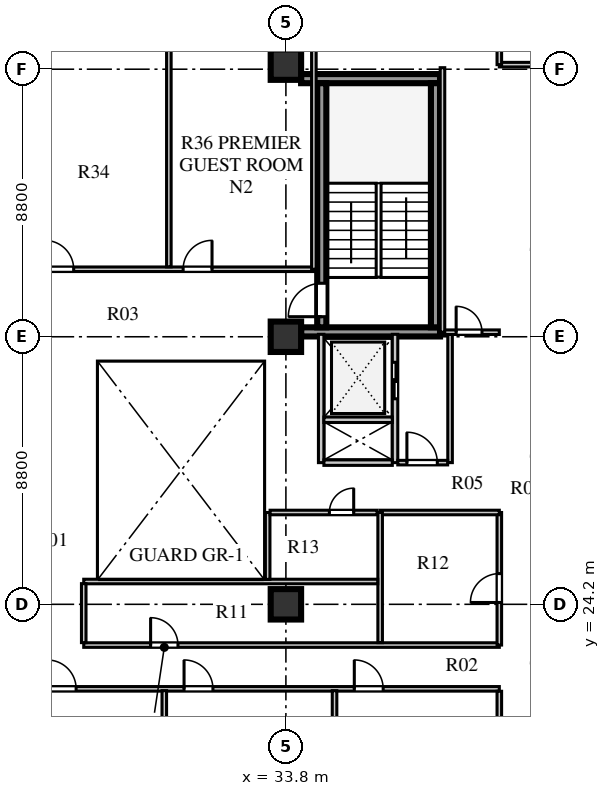
"""IFC4 building model, lengths in metres.
Left out: names, types, materials, properties, quantities, classifications, styles, units other than length and angle.
Written with IfcOpenShell. Run it as: python <this file> out.ifc"""

import sys

from ifc_helpers import new_model, si_unit, direction, frame, frame_2d, origin, origin_2d, place, context, subcontext, project, spatial, rectangle, extrude, element, fill, save


model = new_model("IFC4")
c1 = context("Model", 3, precision=1e-05, world=origin(), true_north=direction((0.0, 1.0)))
c2 = subcontext(c1, "Body", "Model", "MODEL_VIEW")
j1 = project(units=[si_unit("LENGTHUNIT", "METRE"), si_unit("PLANEANGLEUNIT", "RADIAN")], contexts=[c1])
p1 = place(None, origin())
s1 = spatial("IfcSite", under=j1, at=p1, CompositionType="ELEMENT")
p2 = place(p1, origin())
s2 = spatial("IfcBuilding", under=s1, at=p2, CompositionType="ELEMENT")
p3 = place(p2, frame((0.0, 0.0, 127.1)))
s3 = spatial("IfcBuildingStorey", under=s2, at=p3, CompositionType="ELEMENT", Elevation=127.1)
for number, where, z_axis, x_axis in (
    (1, (34.3, 33.16, 0.0), (0.0, 0.0, 1.0), (1.0, 0.0, 0.0)),
    (2, (34.3, 41.49, 0.0), (0.0, 0.0, 1.0), (1.0, 0.0, 0.0)),
):
    element("IfcWall", number, at=place(p3, frame(where, z_axis=z_axis, x_axis=x_axis)), inside=s3, PredefinedType="SHEAR", context=c2, shape_type="SweptSolid", body=[
        extrude(rectangle(XDim=4.57, YDim=0.3, at=frame_2d((2.285, 0.0))), origin(), (0.0, 0.0, 1.0), 3.6),
    ])
p4 = place(p3, frame((34.98, 33.31, 0.0), z_axis=(0.0, 0.0, 1.0), x_axis=(0.0, 1.0, 0.0)))
e3 = element("IfcWall", 3, at=p4, inside=s3, PredefinedType="SHEAR", context=c2, shape_type="SweptSolid", body=[
    extrude(rectangle(XDim=8.03, YDim=0.3, at=frame_2d((4.015, 0.0))), origin(), (0.0, 0.0, 1.0), 3.6),
])
p5 = place(p4, frame((0.35, 0.0, 0.0)))
e4 = element("IfcOpeningElement", 4, at=p5, cuts=e3, PredefinedType="OPENING", context=c2, shape_type="SweptSolid", body=[
    extrude(rectangle(XDim=1.1, YDim=2.1, at=frame_2d((0.55, 1.05))), frame((0.0, 0.16, 0.0), z_axis=(0.0, -1.0, 0.0), x_axis=(1.0, 0.0, 0.0)), (0.0, 0.0, 1.0), 0.32),
])
p6 = place(p3, frame((38.72, 33.31, 0.0), z_axis=(0.0, 0.0, 1.0), x_axis=(0.0, 1.0, 0.0)))
e5 = element("IfcWall", 5, at=p6, inside=s3, PredefinedType="SHEAR", context=c2, shape_type="SweptSolid", body=[
    extrude(rectangle(XDim=8.03, YDim=0.3, at=frame_2d((4.015, 0.0))), origin(), (0.0, 0.0, 1.0), 3.6),
])
for number, where, z_axis, x_axis in (
    (6, (33.8, 24.2, 0.0), (0.0, 0.0, 1.0), (1.0, 0.0, 0.0)),
    (7, (33.8, 33.0, 0.0), (0.0, 0.0, 1.0), (1.0, 0.0, 0.0)),
    (8, (33.8, 41.95, 0.0), (0.0, 0.0, 1.0), (1.0, 0.0, 0.0)),
):
    element("IfcColumn", number, at=place(p3, frame(where, z_axis=z_axis, x_axis=x_axis)), inside=s3, PredefinedType="COLUMN", context=c2, shape_type="SweptSolid", body=[
        extrude(rectangle(XDim=1.0, YDim=1.0, at=origin_2d()), origin(), (0.0, 0.0, 1.0), 3.6),
    ])
p7 = place(p3, frame((34.96, 28.86, 0.0), z_axis=(0.0, 0.0, 1.0), x_axis=(0.0, 1.0, 0.0)))
e9 = element("IfcWall", 9, at=p7, inside=s3, PredefinedType="SOLIDWALL", context=c2, shape_type="SweptSolid", body=[
    extrude(rectangle(XDim=4.22, YDim=0.18, at=frame_2d((2.11, 0.0))), origin(), (0.0, 0.0, 1.0), 3.6),
])
p8 = place(p3, frame((37.39, 28.86, 0.0), z_axis=(0.0, 0.0, 1.0), x_axis=(0.0, 1.0, 0.0)))
e10 = element("IfcWall", 10, at=p8, inside=s3, PredefinedType="SOLIDWALL", context=c2, shape_type="SweptSolid", body=[
    extrude(rectangle(XDim=4.22, YDim=0.18, at=frame_2d((2.11, 0.0))), origin(), (0.0, 0.0, 1.0), 3.6),
])
p9 = place(p8, frame((2.1, 0.0, 0.0)))
e11 = element("IfcOpeningElement", 11, at=p9, cuts=e10, PredefinedType="OPENING", context=c2, shape_type="SweptSolid", body=[
    extrude(rectangle(XDim=1.2, YDim=2.12, at=frame_2d((0.6, 1.06))), frame((0.0, 0.1, 0.0), z_axis=(0.0, -1.0, 0.0), x_axis=(1.0, 0.0, 0.0)), (0.0, 0.0, 1.0), 0.2),
])
for number, where, z_axis, x_axis in (
    (12, (35.05, 28.86, 0.0), (0.0, 0.0, 1.0), (1.0, 0.0, 0.0)),
    (13, (35.05, 30.27, 0.0), (0.0, 0.0, 1.0), (1.0, 0.0, 0.0)),
):
    element("IfcWall", number, at=place(p3, frame(where, z_axis=z_axis, x_axis=x_axis)), inside=s3, PredefinedType="SOLIDWALL", context=c2, shape_type="SweptSolid", body=[
        extrude(rectangle(XDim=2.25, YDim=0.18, at=frame_2d((1.125, 0.0))), origin(), (0.0, 0.0, 1.0), 3.6),
    ])
p10 = place(p3, frame((39.2, 28.86, 0.0), z_axis=(0.0, 0.0, 1.0), x_axis=(0.0, 1.0, 0.0)))
e14 = element("IfcWall", 14, at=p10, inside=s3, PredefinedType="PARTITIONING", context=c2, shape_type="SweptSolid", body=[
    extrude(rectangle(XDim=4.22, YDim=0.15, at=frame_2d((2.11, 0.0))), origin(), (0.0, 0.0, 1.0), 3.6),
])
p11 = place(p3, frame((37.48, 28.86, 0.0), z_axis=(0.0, 0.0, 1.0), x_axis=(1.0, 0.0, 0.0)))
e15 = element("IfcWall", 15, at=p11, inside=s3, PredefinedType="PARTITIONING", context=c2, shape_type="SweptSolid", body=[
    extrude(rectangle(XDim=1.64, YDim=0.15, at=frame_2d((0.82, 0.0))), origin(), (0.0, 0.0, 1.0), 3.6),
])
p12 = place(p11, frame((0.3, 0.0, 0.0)))
e16 = element("IfcOpeningElement", 16, at=p12, cuts=e15, PredefinedType="OPENING", context=c2, shape_type="SweptSolid", body=[
    extrude(rectangle(XDim=1.0, YDim=2.1, at=frame_2d((0.5, 1.05))), frame((0.0, 0.085, 0.0), z_axis=(0.0, -1.0, 0.0), x_axis=(1.0, 0.0, 0.0)), (0.0, 0.0, 1.0), 0.17),
])
p13 = place(p3, frame((25.22, 21.42, 0.0), z_axis=(0.0, 0.0, 1.0), x_axis=(1.0, 0.0, 0.0)))
e17 = element("IfcWall", 17, at=p13, inside=s3, PredefinedType="PARTITIONING", context=c2, shape_type="SweptSolid", body=[
    extrude(rectangle(XDim=15.6, YDim=0.15, at=frame_2d((7.8, 0.0))), origin(), (0.0, 0.0, 1.0), 3.2),
])
p14 = place(p13, frame((0.73, 0.0, 0.0)))
e18 = element("IfcOpeningElement", 18, at=p14, cuts=e17, PredefinedType="OPENING", context=c2, shape_type="SweptSolid", body=[
    extrude(rectangle(XDim=0.95, YDim=2.1, at=frame_2d((0.475, 1.05))), frame((0.0, 0.085, 0.0), z_axis=(0.0, -1.0, 0.0), x_axis=(1.0, 0.0, 0.0)), (0.0, 0.0, 1.0), 0.17),
])
p15 = place(p13, frame((5.23, 0.0, 0.0)))
e19 = element("IfcOpeningElement", 19, at=p15, cuts=e17, PredefinedType="OPENING", context=c2, shape_type="SweptSolid", body=[
    extrude(rectangle(XDim=0.95, YDim=2.1, at=frame_2d((0.475, 1.05))), frame((0.0, 0.085, 0.0), z_axis=(0.0, -1.0, 0.0), x_axis=(1.0, 0.0, 0.0)), (0.0, 0.0, 1.0), 0.17),
])
p16 = place(p13, frame((10.83, 0.0, 0.0)))
e20 = element("IfcOpeningElement", 20, at=p16, cuts=e17, PredefinedType="OPENING", context=c2, shape_type="SweptSolid", body=[
    extrude(rectangle(XDim=0.95, YDim=2.1, at=frame_2d((0.475, 1.05))), frame((0.0, 0.085, 0.0), z_axis=(0.0, -1.0, 0.0), x_axis=(1.0, 0.0, 0.0)), (0.0, 0.0, 1.0), 0.17),
])
p17 = place(p3, frame((27.15, 22.86, 0.0), z_axis=(0.0, 0.0, 1.0), x_axis=(1.0, 0.0, 0.0)))
e21 = element("IfcWall", 21, at=p17, inside=s3, PredefinedType="PARTITIONING", context=c2, shape_type="SweptSolid", body=[
    extrude(rectangle(XDim=13.67, YDim=0.15, at=frame_2d((6.835, 0.0))), origin(), (0.0, 0.0, 1.0), 3.6),
])
p18 = place(p17, frame((2.2, 0.0, 0.0)))
e22 = element("IfcOpeningElement", 22, at=p18, cuts=e21, PredefinedType="OPENING", context=c2, shape_type="SweptSolid", body=[
    extrude(rectangle(XDim=0.9, YDim=2.08, at=frame_2d((0.45, 1.04))), frame((0.0, 0.085, 0.0), z_axis=(0.0, -1.0, 0.0), x_axis=(1.0, 0.0, 0.0)), (0.0, 0.0, 1.0), 0.17),
])
p19 = place(p3, frame((25.22, 35.22, 0.0), z_axis=(0.0, 0.0, 1.0), x_axis=(1.0, 0.0, 0.0)))
e23 = element("IfcWall", 23, at=p19, inside=s3, PredefinedType="PARTITIONING", context=c2, shape_type="SweptSolid", body=[
    extrude(rectangle(XDim=9.5, YDim=0.15, at=frame_2d((4.75, 0.0))), origin(), (0.0, 0.0, 1.0), 3.6),
])
p20 = place(p19, frame((0.65, 0.0, 0.0)))
e24 = element("IfcOpeningElement", 24, at=p20, cuts=e23, PredefinedType="OPENING", context=c2, shape_type="SweptSolid", body=[
    extrude(rectangle(XDim=0.95, YDim=2.1, at=frame_2d((0.475, 1.05))), frame((0.0, 0.085, 0.0), z_axis=(0.0, -1.0, 0.0), x_axis=(1.0, 0.0, 0.0)), (0.0, 0.0, 1.0), 0.17),
])
p21 = place(p19, frame((5.2, 0.0, 0.0)))
e25 = element("IfcOpeningElement", 25, at=p21, cuts=e23, PredefinedType="OPENING", context=c2, shape_type="SweptSolid", body=[
    extrude(rectangle(XDim=0.95, YDim=2.1, at=frame_2d((0.475, 1.05))), frame((0.0, 0.085, 0.0), z_axis=(0.0, -1.0, 0.0), x_axis=(1.0, 0.0, 0.0)), (0.0, 0.0, 1.0), 0.17),
])
p22 = place(p3, frame((40.82, 41.95, 0.0), z_axis=(0.0, 0.0, 1.0), x_axis=(1.0, 0.0, 0.0)))
e26 = element("IfcWall", 26, at=p22, inside=s3, PredefinedType="PARTITIONING", context=c2, shape_type="SweptSolid", body=[
    extrude(rectangle(XDim=7.3, YDim=0.15, at=frame_2d((3.65, 0.0))), origin(), (0.0, 0.0, 1.0), 2.95),
])
p23 = place(p3, frame((40.82, 22.86, 0.0), z_axis=(0.0, 0.0, 1.0), x_axis=(0.0, 1.0, 0.0)))
e27 = element("IfcWall", 27, at=p23, inside=s3, PredefinedType="PARTITIONING", context=c2, shape_type="SweptSolid", body=[
    extrude(rectangle(XDim=4.36, YDim=0.15, at=frame_2d((2.18, 0.0))), origin(), (0.0, 0.0, 1.0), 3.6),
])
p24 = place(p23, frame((1.4, 0.0, 0.0)))
e28 = element("IfcOpeningElement", 28, at=p24, cuts=e27, PredefinedType="OPENING", context=c2, shape_type="SweptSolid", body=[
    extrude(rectangle(XDim=0.95, YDim=2.1, at=frame_2d((0.475, 1.05))), frame((0.0, 0.085, 0.0), z_axis=(0.0, -1.0, 0.0), x_axis=(1.0, 0.0, 0.0)), (0.0, 0.0, 1.0), 0.17),
])
p25 = place(p3, frame((36.9, 27.22, 0.0), z_axis=(0.0, 0.0, 1.0), x_axis=(1.0, 0.0, 0.0)))
e29 = element("IfcWall", 29, at=p25, inside=s3, PredefinedType="PARTITIONING", context=c2, shape_type="SweptSolid", body=[
    extrude(rectangle(XDim=3.92, YDim=0.15, at=frame_2d((1.96, 0.0))), origin(), (0.0, 0.0, 1.0), 3.2),
])
p26 = place(p3, frame((36.9, 22.94, 0.0), z_axis=(0.0, 0.0, 1.0), x_axis=(0.0, 1.0, 0.0)))
e30 = element("IfcWall", 30, at=p26, inside=s3, PredefinedType="PARTITIONING", context=c2, shape_type="SweptSolid", body=[
    extrude(rectangle(XDim=4.28, YDim=0.15, at=frame_2d((2.14, 0.0))), origin(), (0.0, 0.0, 1.0), 3.6),
])
p27 = place(p3, frame((27.15, 24.95, 0.0), z_axis=(0.0, 0.0, 1.0), x_axis=(1.0, 0.0, 0.0)))
e31 = element("IfcWall", 31, at=p27, inside=s3, PredefinedType="PARTITIONING", context=c2, shape_type="SweptSolid", body=[
    extrude(rectangle(XDim=9.67, YDim=0.15, at=frame_2d((4.835, 0.0))), origin(), (0.0, 0.0, 1.0), 3.05),
])
p28 = place(p3, frame((27.15, 22.94, 0.0), z_axis=(0.0, 0.0, 1.0), x_axis=(0.0, 1.0, 0.0)))
e32 = element("IfcWall", 32, at=p28, inside=s3, PredefinedType="PARTITIONING", context=c2, shape_type="SweptSolid", body=[
    extrude(rectangle(XDim=1.94, YDim=0.15, at=frame_2d((0.97, 0.0))), origin(), (0.0, 0.0, 1.0), 3.6),
])
p29 = place(p3, frame((33.2, 25.02, 0.0), z_axis=(0.0, 0.0, 1.0), x_axis=(0.0, 1.0, 0.0)))
e33 = element("IfcWall", 33, at=p29, inside=s3, PredefinedType="PARTITIONING", context=c2, shape_type="SweptSolid", body=[
    extrude(rectangle(XDim=2.2, YDim=0.15, at=frame_2d((1.1, 0.0))), origin(), (0.0, 0.0, 1.0), 3.05),
])
p30 = place(p3, frame((33.28, 27.22, 0.0), z_axis=(0.0, 0.0, 1.0), x_axis=(1.0, 0.0, 0.0)))
e34 = element("IfcWall", 34, at=p30, inside=s3, PredefinedType="PARTITIONING", context=c2, shape_type="SweptSolid", body=[
    extrude(rectangle(XDim=3.52, YDim=0.15, at=frame_2d((1.76, 0.0))), origin(), (0.0, 0.0, 1.0), 3.2),
])
p31 = place(p30, frame((1.95, 0.0, 0.0)))
e35 = element("IfcOpeningElement", 35, at=p31, cuts=e34, PredefinedType="OPENING", context=c2, shape_type="SweptSolid", body=[
    extrude(rectangle(XDim=0.8, YDim=2.05, at=frame_2d((0.4, 1.025))), frame((0.0, 0.085, 0.0), z_axis=(0.0, -1.0, 0.0), x_axis=(1.0, 0.0, 0.0)), (0.0, 0.0, 1.0), 0.17),
])
p32 = place(p3, frame((40.82, 10.28, 0.0), z_axis=(0.0, 0.0, 1.0), x_axis=(0.0, 1.0, 0.0)))
e36 = element("IfcWall", 36, at=p32, inside=s3, PredefinedType="PARTITIONING", context=c2, shape_type="SweptSolid", body=[
    extrude(rectangle(XDim=11.06, YDim=0.15, at=frame_2d((5.53, 0.0))), origin(), (0.0, 0.0, 1.0), 3.6),
])
for number, where, z_axis, x_axis in (
    (37, (29.8, 10.28, 0.0), (0.0, 0.0, 1.0), (0.0, 1.0, 0.0)),
    (38, (35.4, 10.28, 0.0), (0.0, 0.0, 1.0), (0.0, 1.0, 0.0)),
):
    element("IfcWall", number, at=place(p3, frame(where, z_axis=z_axis, x_axis=x_axis)), inside=s3, PredefinedType="PARTITIONING", context=c2, shape_type="SweptSolid", body=[
        extrude(rectangle(XDim=11.08, YDim=0.15, at=frame_2d((5.54, 0.0))), origin(), (0.0, 0.0, 1.0), 3.6),
    ])
p33 = place(p3, frame((34.72, 35.22, 0.0), z_axis=(0.0, 0.0, 1.0), x_axis=(0.0, 1.0, 0.0)))
e39 = element("IfcWall", 39, at=p33, inside=s3, PredefinedType="PARTITIONING", context=c2, shape_type="SweptSolid", body=[
    extrude(rectangle(XDim=11.7, YDim=0.15, at=frame_2d((5.85, 0.0))), origin(), (0.0, 0.0, 1.0), 3.6),
])
p34 = place(p3, frame((29.95, 35.3, 0.0), z_axis=(0.0, 0.0, 1.0), x_axis=(0.0, 1.0, 0.0)))
e40 = element("IfcWall", 40, at=p34, inside=s3, PredefinedType="PARTITIONING", context=c2, shape_type="SweptSolid", body=[
    extrude(rectangle(XDim=11.62, YDim=0.15, at=frame_2d((5.81, 0.0))), origin(), (0.0, 0.0, 1.0), 3.6),
])
p35 = place(p3, frame((38.95, 33.15, 0.0), z_axis=(0.0, 0.0, 1.0), x_axis=(1.0, 0.0, 0.0)))
e41 = element("IfcWall", 41, at=p35, inside=s3, PredefinedType="PARTITIONING", context=c2, shape_type="SweptSolid", body=[
    extrude(rectangle(XDim=1.87, YDim=0.15, at=frame_2d((0.935, 0.0))), origin(), (0.0, 0.0, 1.0), 3.6),
])
p36 = place(p35, frame((0.45, 0.0, 0.0)))
e42 = element("IfcOpeningElement", 42, at=p36, cuts=e41, PredefinedType="OPENING", context=c2, shape_type="SweptSolid", body=[
    extrude(rectangle(XDim=0.85, YDim=2.05, at=frame_2d((0.425, 1.025))), frame((0.0, 0.085, 0.0), z_axis=(0.0, -1.0, 0.0), x_axis=(1.0, 0.0, 0.0)), (0.0, 0.0, 1.0), 0.17),
])
p37 = place(p3, frame((38.95, 33.15, 0.0), z_axis=(0.0, 0.0, 1.0), x_axis=(0.0, 1.0, 0.0)))
e43 = element("IfcWall", 43, at=p37, inside=s3, PredefinedType="PARTITIONING", context=c2, shape_type="SweptSolid", body=[
    extrude(rectangle(XDim=8.7, YDim=0.15, at=frame_2d((4.35, 0.0))), origin(), (0.0, 0.0, 1.0), 3.6),
])
p38 = place(p3, frame((40.82, 41.95, 0.0), z_axis=(0.0, 0.0, 1.0), x_axis=(0.0, 1.0, 0.0)))
e44 = element("IfcWall", 44, at=p38, inside=s3, PredefinedType="PARTITIONING", context=c2, shape_type="SweptSolid", body=[
    extrude(rectangle(XDim=4.97, YDim=0.15, at=frame_2d((2.485, 0.0))), origin(), (0.0, 0.0, 1.0), 3.6),
])
p39 = place(p5, origin())
e45 = element("IfcDoor", 45, at=p39, inside=s3, OperationType="SINGLE_SWING_LEFT", PredefinedType="DOOR", context=c2, shape_type="SweptSolid", body=[
    extrude(rectangle(XDim=1.1, YDim=2.1, at=frame_2d((0.55, 1.05))), frame((0.0, 0.025, 0.0), z_axis=(0.0, -1.0, 0.0), x_axis=(1.0, 0.0, 0.0)), (0.0, 0.0, 1.0), 0.05),
])
fill(e4, e45)
p40 = place(p9, frame((1.2, 0.0, 0.0), z_axis=(0.0, 0.0, 1.0), x_axis=(-1.0, 0.0, 0.0)))
e46 = element("IfcDoor", 46, at=p40, inside=s3, OperationType="DOUBLE_DOOR_SLIDING", PredefinedType="DOOR", context=c2, shape_type="SweptSolid", body=[
    extrude(rectangle(XDim=1.2, YDim=2.12, at=frame_2d((0.6, 1.06))), frame((0.0, 0.025, 0.0), z_axis=(0.0, -1.0, 0.0), x_axis=(1.0, 0.0, 0.0)), (0.0, 0.0, 1.0), 0.05),
])
fill(e11, e46)
p41 = place(p12, origin())
e47 = element("IfcDoor", 47, at=p41, inside=s3, OperationType="SINGLE_SWING_LEFT", PredefinedType="DOOR", context=c2, shape_type="SweptSolid", body=[
    extrude(rectangle(XDim=1.0, YDim=2.1, at=frame_2d((0.5, 1.05))), frame((0.0, 0.025, 0.0), z_axis=(0.0, -1.0, 0.0), x_axis=(1.0, 0.0, 0.0)), (0.0, 0.0, 1.0), 0.05),
])
fill(e16, e47)
p42 = place(p31, frame((0.8, 0.0, 0.0), z_axis=(0.0, 0.0, 1.0), x_axis=(-1.0, 0.0, 0.0)))
e48 = element("IfcDoor", 48, at=p42, inside=s3, OperationType="SINGLE_SWING_LEFT", PredefinedType="DOOR", context=c2, shape_type="SweptSolid", body=[
    extrude(rectangle(XDim=0.8, YDim=2.05, at=frame_2d((0.4, 1.025))), frame((0.0, 0.025, 0.0), z_axis=(0.0, -1.0, 0.0), x_axis=(1.0, 0.0, 0.0)), (0.0, 0.0, 1.0), 0.05),
])
fill(e35, e48)
p43 = place(p18, origin())
e49 = element("IfcDoor", 49, at=p43, inside=s3, OperationType="SINGLE_SWING_LEFT", PredefinedType="DOOR", context=c2, shape_type="SweptSolid", body=[
    extrude(rectangle(XDim=0.9, YDim=2.08, at=frame_2d((0.45, 1.04))), frame((0.0, 0.025, 0.0), z_axis=(0.0, -1.0, 0.0), x_axis=(1.0, 0.0, 0.0)), (0.0, 0.0, 1.0), 0.05),
])
fill(e22, e49)
p44 = place(p24, frame((0.95, 0.0, 0.0), z_axis=(0.0, 0.0, 1.0), x_axis=(-1.0, 0.0, 0.0)))
e50 = element("IfcDoor", 50, at=p44, inside=s3, OperationType="SINGLE_SWING_RIGHT", PredefinedType="DOOR", context=c2, shape_type="SweptSolid", body=[
    extrude(rectangle(XDim=0.95, YDim=2.1, at=frame_2d((0.475, 1.05))), frame((0.0, 0.025, 0.0), z_axis=(0.0, -1.0, 0.0), x_axis=(1.0, 0.0, 0.0)), (0.0, 0.0, 1.0), 0.05),
])
fill(e28, e50)
p45 = place(p14, frame((0.95, 0.0, 0.0), z_axis=(0.0, 0.0, 1.0), x_axis=(-1.0, 0.0, 0.0)))
e51 = element("IfcDoor", 51, at=p45, inside=s3, OperationType="SINGLE_SWING_RIGHT", PredefinedType="DOOR", context=c2, shape_type="SweptSolid", body=[
    extrude(rectangle(XDim=0.95, YDim=2.1, at=frame_2d((0.475, 1.05))), frame((0.0, 0.025, 0.0), z_axis=(0.0, -1.0, 0.0), x_axis=(1.0, 0.0, 0.0)), (0.0, 0.0, 1.0), 0.05),
])
fill(e18, e51)
p46 = place(p15, frame((0.95, 0.0, 0.0), z_axis=(0.0, 0.0, 1.0), x_axis=(-1.0, 0.0, 0.0)))
e52 = element("IfcDoor", 52, at=p46, inside=s3, OperationType="SINGLE_SWING_RIGHT", PredefinedType="DOOR", context=c2, shape_type="SweptSolid", body=[
    extrude(rectangle(XDim=0.95, YDim=2.1, at=frame_2d((0.475, 1.05))), frame((0.0, 0.025, 0.0), z_axis=(0.0, -1.0, 0.0), x_axis=(1.0, 0.0, 0.0)), (0.0, 0.0, 1.0), 0.05),
])
fill(e19, e52)
p47 = place(p16, frame((0.95, 0.0, 0.0), z_axis=(0.0, 0.0, 1.0), x_axis=(-1.0, 0.0, 0.0)))
e53 = element("IfcDoor", 53, at=p47, inside=s3, OperationType="SINGLE_SWING_RIGHT", PredefinedType="DOOR", context=c2, shape_type="SweptSolid", body=[
    extrude(rectangle(XDim=0.95, YDim=2.1, at=frame_2d((0.475, 1.05))), frame((0.0, 0.025, 0.0), z_axis=(0.0, -1.0, 0.0), x_axis=(1.0, 0.0, 0.0)), (0.0, 0.0, 1.0), 0.05),
])
fill(e20, e53)
p48 = place(p20, origin())
e54 = element("IfcDoor", 54, at=p48, inside=s3, OperationType="SINGLE_SWING_LEFT", PredefinedType="DOOR", context=c2, shape_type="SweptSolid", body=[
    extrude(rectangle(XDim=0.95, YDim=2.1, at=frame_2d((0.475, 1.05))), frame((0.0, 0.025, 0.0), z_axis=(0.0, -1.0, 0.0), x_axis=(1.0, 0.0, 0.0)), (0.0, 0.0, 1.0), 0.05),
])
fill(e24, e54)
p49 = place(p21, origin())
e55 = element("IfcDoor", 55, at=p49, inside=s3, OperationType="SINGLE_SWING_RIGHT", PredefinedType="DOOR", context=c2, shape_type="SweptSolid", body=[
    extrude(rectangle(XDim=0.95, YDim=2.1, at=frame_2d((0.475, 1.05))), frame((0.0, 0.025, 0.0), z_axis=(0.0, -1.0, 0.0), x_axis=(1.0, 0.0, 0.0)), (0.0, 0.0, 1.0), 0.05),
])
fill(e25, e55)
p50 = place(p36, origin())
e56 = element("IfcDoor", 56, at=p50, inside=s3, OperationType="SINGLE_SWING_LEFT", PredefinedType="DOOR", context=c2, shape_type="SweptSolid", body=[
    extrude(rectangle(XDim=0.85, YDim=2.05, at=frame_2d((0.425, 1.025))), frame((0.0, 0.025, 0.0), z_axis=(0.0, -1.0, 0.0), x_axis=(1.0, 0.0, 0.0)), (0.0, 0.0, 1.0), 0.05),
])
fill(e42, e56)
save(model, sys.argv[1])
